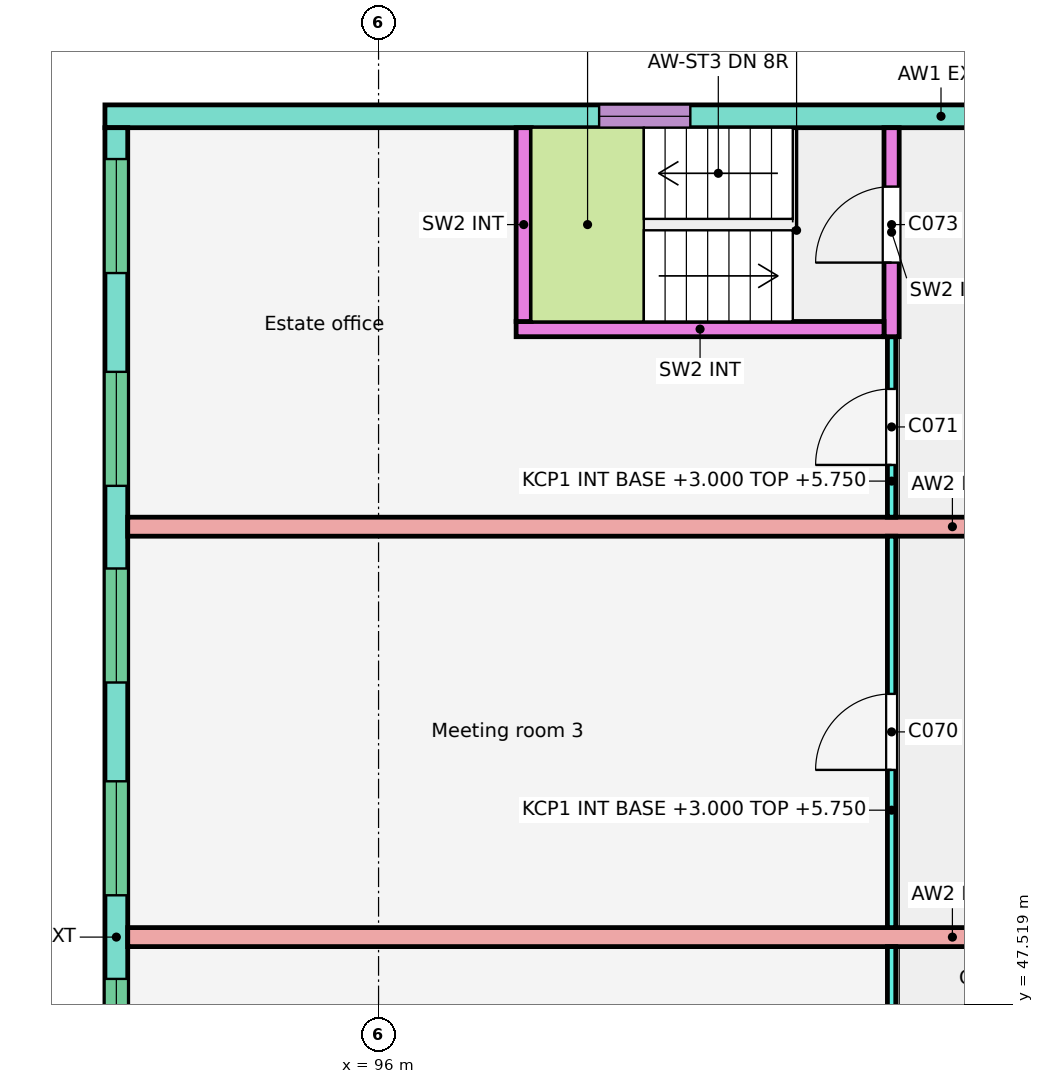
"""IFC4 building model, lengths in metres.
Left out: names, types, materials, properties, quantities, classifications, styles, units other than length and angle.
Written with IfcOpenShell. Run it as: python <this file> out.ifc"""

import sys

from ifc_helpers import new_model, si_unit, direction, frame, frame_2d, origin, place, context, subcontext, project, spatial, rectangle, extrude, element, fill, save


model = new_model("IFC4")
c1 = context("Model", 3, precision=1e-05, world=origin(), true_north=direction((0.0, 1.0)))
c2 = subcontext(c1, "Body", "Model", "MODEL_VIEW")
j1 = project(units=[si_unit("LENGTHUNIT", "METRE"), si_unit("PLANEANGLEUNIT", "RADIAN")], contexts=[c1])
p1 = place(None, origin())
s1 = spatial("IfcSite", under=j1, at=p1, CompositionType="ELEMENT")
p2 = place(p1, origin())
s2 = spatial("IfcBuilding", under=s1, at=p2, CompositionType="ELEMENT")
p3 = place(p2, frame((0.0, 0.0, 3.0)))
s3 = spatial("IfcBuildingStorey", under=s2, at=p3, CompositionType="ELEMENT", Elevation=3.0)
p4 = place(p3, frame((114.4, 59.2, 0.0), z_axis=(0.0, 0.0, 1.0), x_axis=(-1.0, 0.0, 0.0)))
e1 = element("IfcWall", 1, at=p4, inside=s3, PredefinedType="SOLIDWALL", context=c2, shape_type="SweptSolid", body=[
    extrude(rectangle(XDim=22.0, YDim=0.3, at=frame_2d((11.0, 0.0))), origin(), (0.0, 0.0, 1.0), 3.0),
])
p5 = place(p4, frame((14.298, 0.0, 0.9)))
e2 = element("IfcOpeningElement", 2, at=p5, cuts=e1, PredefinedType="OPENING", context=c2, shape_type="SweptSolid", body=[
    extrude(rectangle(XDim=1.2, YDim=1.5, at=frame_2d((0.6, 0.75))), frame((0.0, 0.16, 0.0), z_axis=(0.0, -1.0, 0.0), x_axis=(1.0, 0.0, 0.0)), (0.0, 0.0, 1.0), 0.32),
])
p6 = place(p3, frame((92.55, 37.75, 0.0), z_axis=(0.0, 0.0, 1.0), x_axis=(0.0, 1.0, 0.0)))
e3 = element("IfcWall", 3, at=p6, inside=s3, PredefinedType="SOLIDWALL", context=c2, shape_type="SweptSolid", body=[
    extrude(rectangle(XDim=21.3, YDim=0.3, at=frame_2d((10.65, 0.0))), origin(), (0.0, 0.0, 1.0), 3.0),
])
p7 = place(p6, frame((0.413, 0.0, 0.9)))
e4 = element("IfcOpeningElement", 4, at=p7, cuts=e3, PredefinedType="OPENING", context=c2, shape_type="SweptSolid", body=[
    extrude(rectangle(XDim=1.5, YDim=1.4, at=frame_2d((0.75, 0.7))), frame((0.0, 0.16, 0.0), z_axis=(0.0, -1.0, 0.0), x_axis=(1.0, 0.0, 0.0)), (0.0, 0.0, 1.0), 0.32),
])
p8 = place(p6, frame((3.212, 0.0, 0.9)))
e5 = element("IfcOpeningElement", 5, at=p8, cuts=e3, PredefinedType="OPENING", context=c2, shape_type="SweptSolid", body=[
    extrude(rectangle(XDim=1.5, YDim=1.4, at=frame_2d((0.75, 0.7))), frame((0.0, 0.16, 0.0), z_axis=(0.0, -1.0, 0.0), x_axis=(1.0, 0.0, 0.0)), (0.0, 0.0, 1.0), 0.32),
])
p9 = place(p6, frame((5.8, 0.0, 0.9)))
e6 = element("IfcOpeningElement", 6, at=p9, cuts=e3, PredefinedType="OPENING", context=c2, shape_type="SweptSolid", body=[
    extrude(rectangle(XDim=1.5, YDim=1.4, at=frame_2d((0.75, 0.7))), frame((0.0, 0.16, 0.0), z_axis=(0.0, -1.0, 0.0), x_axis=(1.0, 0.0, 0.0)), (0.0, 0.0, 1.0), 0.32),
])
p10 = place(p6, frame((8.6, 0.0, 0.9)))
e7 = element("IfcOpeningElement", 7, at=p10, cuts=e3, PredefinedType="OPENING", context=c2, shape_type="SweptSolid", body=[
    extrude(rectangle(XDim=1.5, YDim=1.4, at=frame_2d((0.75, 0.7))), frame((0.0, 0.16, 0.0), z_axis=(0.0, -1.0, 0.0), x_axis=(1.0, 0.0, 0.0)), (0.0, 0.0, 1.0), 0.32),
])
p11 = place(p6, frame((11.2, 0.0, 0.9)))
e8 = element("IfcOpeningElement", 8, at=p11, cuts=e3, PredefinedType="OPENING", context=c2, shape_type="SweptSolid", body=[
    extrude(rectangle(XDim=1.5, YDim=1.4, at=frame_2d((0.75, 0.7))), frame((0.0, 0.16, 0.0), z_axis=(0.0, -1.0, 0.0), x_axis=(1.0, 0.0, 0.0)), (0.0, 0.0, 1.0), 0.32),
])
p12 = place(p6, frame((14.0, 0.0, 0.9)))
e9 = element("IfcOpeningElement", 9, at=p12, cuts=e3, PredefinedType="OPENING", context=c2, shape_type="SweptSolid", body=[
    extrude(rectangle(XDim=1.5, YDim=1.4, at=frame_2d((0.75, 0.7))), frame((0.0, 0.16, 0.0), z_axis=(0.0, -1.0, 0.0), x_axis=(1.0, 0.0, 0.0)), (0.0, 0.0, 1.0), 0.32),
])
p13 = place(p6, frame((16.587, 0.0, 0.9)))
e10 = element("IfcOpeningElement", 10, at=p13, cuts=e3, PredefinedType="OPENING", context=c2, shape_type="SweptSolid", body=[
    extrude(rectangle(XDim=1.5, YDim=1.4, at=frame_2d((0.75, 0.7))), frame((0.0, 0.16, 0.0), z_axis=(0.0, -1.0, 0.0), x_axis=(1.0, 0.0, 0.0)), (0.0, 0.0, 1.0), 0.32),
])
p14 = place(p6, frame((19.387, 0.0, 0.9)))
e11 = element("IfcOpeningElement", 11, at=p14, cuts=e3, PredefinedType="OPENING", context=c2, shape_type="SweptSolid", body=[
    extrude(rectangle(XDim=1.5, YDim=1.4, at=frame_2d((0.75, 0.7))), frame((0.0, 0.16, 0.0), z_axis=(0.0, -1.0, 0.0), x_axis=(1.0, 0.0, 0.0)), (0.0, 0.0, 1.0), 0.32),
])
for number, where, z_axis, x_axis in (
    (12, (114.4, 48.4, 0.0), (0.0, 0.0, 1.0), (-1.0, 0.0, 0.0)),
    (13, (114.4, 53.8, 0.0), (0.0, 0.0, 1.0), (-1.0, 0.0, 0.0)),
):
    element("IfcWall", number, at=place(p3, frame(where, z_axis=z_axis, x_axis=x_axis)), inside=s3, PredefinedType="SOLIDWALL", context=c2, shape_type="SweptSolid", body=[
        extrude(rectangle(XDim=21.7, YDim=0.25, at=frame_2d((10.85, 0.0))), origin(), (0.0, 0.0, 1.0), 3.0),
    ])
p15 = place(p3, frame((102.75, 43.125, 0.0), z_axis=(0.0, 0.0, 1.0), x_axis=(0.0, 1.0, 0.0)))
e14 = element("IfcWall", 14, at=p15, inside=s3, PredefinedType="PARTITIONING", context=c2, shape_type="SweptSolid", body=[
    extrude(rectangle(XDim=5.15, YDim=0.11, at=frame_2d((2.575, 0.0))), origin(), (0.0, 0.0, 1.0), 2.75),
])
p16 = place(p15, frame((0.698, 0.0, 0.0)))
e15 = element("IfcOpeningElement", 15, at=p16, cuts=e14, PredefinedType="OPENING", context=c2, shape_type="SweptSolid", body=[
    extrude(rectangle(XDim=1.0, YDim=2.1, at=frame_2d((0.5, 1.05))), frame((0.0, 0.065, 0.0), z_axis=(0.0, -1.0, 0.0), x_axis=(1.0, 0.0, 0.0)), (0.0, 0.0, 1.0), 0.13),
])
p17 = place(p15, frame((3.327, 0.0, 0.0)))
e16 = element("IfcOpeningElement", 16, at=p17, cuts=e14, PredefinedType="OPENING", context=c2, shape_type="SweptSolid", body=[
    extrude(rectangle(XDim=1.0, YDim=2.1, at=frame_2d((0.5, 1.05))), frame((0.0, 0.065, 0.0), z_axis=(0.0, -1.0, 0.0), x_axis=(1.0, 0.0, 0.0)), (0.0, 0.0, 1.0), 0.13),
])
p18 = place(p3, frame((102.75, 48.525, 0.0), z_axis=(0.0, 0.0, 1.0), x_axis=(0.0, 1.0, 0.0)))
e17 = element("IfcWall", 17, at=p18, inside=s3, PredefinedType="PARTITIONING", context=c2, shape_type="SweptSolid", body=[
    extrude(rectangle(XDim=5.15, YDim=0.11, at=frame_2d((2.575, 0.0))), origin(), (0.0, 0.0, 1.0), 2.75),
])
p19 = place(p18, frame((2.075, 0.0, 0.0)))
e18 = element("IfcOpeningElement", 18, at=p19, cuts=e17, PredefinedType="OPENING", context=c2, shape_type="SweptSolid", body=[
    extrude(rectangle(XDim=1.0, YDim=2.1, at=frame_2d((0.5, 1.05))), frame((0.0, 0.065, 0.0), z_axis=(0.0, -1.0, 0.0), x_axis=(1.0, 0.0, 0.0)), (0.0, 0.0, 1.0), 0.13),
])
p20 = place(p3, frame((102.75, 53.925, 0.0), z_axis=(0.0, 0.0, 1.0), x_axis=(0.0, 1.0, 0.0)))
e19 = element("IfcWall", 19, at=p20, inside=s3, PredefinedType="PARTITIONING", context=c2, shape_type="SweptSolid", body=[
    extrude(rectangle(XDim=2.375, YDim=0.11, at=frame_2d((1.188, 0.0))), origin(), (0.0, 0.0, 1.0), 2.75),
])
p21 = place(p20, frame((0.688, 0.0, 0.0)))
e20 = element("IfcOpeningElement", 20, at=p21, cuts=e19, PredefinedType="OPENING", context=c2, shape_type="SweptSolid", body=[
    extrude(rectangle(XDim=1.0, YDim=2.1, at=frame_2d((0.5, 1.05))), frame((0.0, 0.065, 0.0), z_axis=(0.0, -1.0, 0.0), x_axis=(1.0, 0.0, 0.0)), (0.0, 0.0, 1.0), 0.13),
])
p22 = place(p3, frame((102.75, 56.3, 0.0), z_axis=(0.0, 0.0, 1.0), x_axis=(0.0, 1.0, 0.0)))
e21 = element("IfcWall", 21, at=p22, inside=s3, PredefinedType="SOLIDWALL", context=c2, shape_type="SweptSolid", body=[
    extrude(rectangle(XDim=2.75, YDim=0.2, at=frame_2d((1.375, 0.0))), origin(), (0.0, 0.0, 1.0), 2.75),
])
p23 = place(p22, frame((0.975, 0.0, 0.0)))
e22 = element("IfcOpeningElement", 22, at=p23, cuts=e21, PredefinedType="OPENING", context=c2, shape_type="SweptSolid", body=[
    extrude(rectangle(XDim=1.0, YDim=2.1, at=frame_2d((0.5, 1.05))), frame((0.0, 0.11, 0.0), z_axis=(0.0, -1.0, 0.0), x_axis=(1.0, 0.0, 0.0)), (0.0, 0.0, 1.0), 0.22),
])
p24 = place(p3, frame((102.65, 56.4, 0.0), z_axis=(0.0, 0.0, 1.0), x_axis=(-1.0, 0.0, 0.0)))
e23 = element("IfcWall", 23, at=p24, inside=s3, PredefinedType="SOLIDWALL", context=c2, shape_type="SweptSolid", body=[
    extrude(rectangle(XDim=4.84, YDim=0.2, at=frame_2d((2.42, 0.0))), origin(), (0.0, 0.0, 1.0), 2.75),
])
p25 = place(p3, frame((97.91, 59.05, 0.0), z_axis=(0.0, 0.0, 1.0), x_axis=(0.0, -1.0, 0.0)))
e24 = element("IfcWall", 24, at=p25, inside=s3, PredefinedType="SOLIDWALL", context=c2, shape_type="SweptSolid", body=[
    extrude(rectangle(XDim=2.55, YDim=0.2, at=frame_2d((1.275, 0.0))), origin(), (0.0, 0.0, 1.0), 2.75),
])
p26 = place(p10, origin())
e25 = element("IfcWindow", 25, at=p26, inside=s3, PartitioningType="SINGLE_PANEL", PredefinedType="WINDOW", context=c2, shape_type="SweptSolid", body=[
    extrude(rectangle(XDim=1.5, YDim=1.4, at=frame_2d((0.75, 0.7))), frame((0.0, 0.03, 0.0), z_axis=(0.0, -1.0, 0.0), x_axis=(1.0, 0.0, 0.0)), (0.0, 0.0, 1.0), 0.06),
])
fill(e7, e25)
p27 = place(p11, origin())
e26 = element("IfcWindow", 26, at=p27, inside=s3, PartitioningType="SINGLE_PANEL", PredefinedType="WINDOW", context=c2, shape_type="SweptSolid", body=[
    extrude(rectangle(XDim=1.5, YDim=1.4, at=frame_2d((0.75, 0.7))), frame((0.0, 0.03, 0.0), z_axis=(0.0, -1.0, 0.0), x_axis=(1.0, 0.0, 0.0)), (0.0, 0.0, 1.0), 0.06),
])
fill(e8, e26)
p28 = place(p12, origin())
e27 = element("IfcWindow", 27, at=p28, inside=s3, PartitioningType="SINGLE_PANEL", PredefinedType="WINDOW", context=c2, shape_type="SweptSolid", body=[
    extrude(rectangle(XDim=1.5, YDim=1.4, at=frame_2d((0.75, 0.7))), frame((0.0, 0.03, 0.0), z_axis=(0.0, -1.0, 0.0), x_axis=(1.0, 0.0, 0.0)), (0.0, 0.0, 1.0), 0.06),
])
fill(e9, e27)
p29 = place(p13, origin())
e28 = element("IfcWindow", 28, at=p29, inside=s3, PartitioningType="SINGLE_PANEL", PredefinedType="WINDOW", context=c2, shape_type="SweptSolid", body=[
    extrude(rectangle(XDim=1.5, YDim=1.4, at=frame_2d((0.75, 0.7))), frame((0.0, 0.03, 0.0), z_axis=(0.0, -1.0, 0.0), x_axis=(1.0, 0.0, 0.0)), (0.0, 0.0, 1.0), 0.06),
])
fill(e10, e28)
p30 = place(p14, origin())
e29 = element("IfcWindow", 29, at=p30, inside=s3, PartitioningType="SINGLE_PANEL", PredefinedType="WINDOW", context=c2, shape_type="SweptSolid", body=[
    extrude(rectangle(XDim=1.5, YDim=1.4, at=frame_2d((0.75, 0.7))), frame((0.0, 0.03, 0.0), z_axis=(0.0, -1.0, 0.0), x_axis=(1.0, 0.0, 0.0)), (0.0, 0.0, 1.0), 0.06),
])
fill(e11, e29)
p31 = place(p5, origin())
e30 = element("IfcWindow", 30, at=p31, inside=s3, PartitioningType="SINGLE_PANEL", PredefinedType="WINDOW", context=c2, shape_type="SweptSolid", body=[
    extrude(rectangle(XDim=1.2, YDim=1.5, at=frame_2d((0.6, 0.75))), frame((0.0, 0.03, 0.0), z_axis=(0.0, -1.0, 0.0), x_axis=(1.0, 0.0, 0.0)), (0.0, 0.0, 1.0), 0.06),
])
fill(e2, e30)
p32 = place(p19, origin())
e31 = element("IfcDoor", 31, at=p32, inside=s3, OperationType="SINGLE_SWING_LEFT", PredefinedType="DOOR", context=c2, shape_type="SweptSolid", body=[
    extrude(rectangle(XDim=1.0, YDim=2.1, at=frame_2d((0.5, 1.05))), frame((0.0, 0.025, 0.0), z_axis=(0.0, -1.0, 0.0), x_axis=(1.0, 0.0, 0.0)), (0.0, 0.0, 1.0), 0.05),
])
fill(e18, e31)
p33 = place(p21, origin())
e32 = element("IfcDoor", 32, at=p33, inside=s3, OperationType="SINGLE_SWING_LEFT", PredefinedType="DOOR", context=c2, shape_type="SweptSolid", body=[
    extrude(rectangle(XDim=1.0, YDim=2.1, at=frame_2d((0.5, 1.05))), frame((0.0, 0.025, 0.0), z_axis=(0.0, -1.0, 0.0), x_axis=(1.0, 0.0, 0.0)), (0.0, 0.0, 1.0), 0.05),
])
fill(e20, e32)
p34 = place(p23, origin())
e33 = element("IfcDoor", 33, at=p34, inside=s3, OperationType="SINGLE_SWING_LEFT", PredefinedType="DOOR", context=c2, shape_type="SweptSolid", body=[
    extrude(rectangle(XDim=1.0, YDim=2.1, at=frame_2d((0.5, 1.05))), frame((0.0, 0.025, 0.0), z_axis=(0.0, -1.0, 0.0), x_axis=(1.0, 0.0, 0.0)), (0.0, 0.0, 1.0), 0.05),
])
fill(e22, e33)
save(model, sys.argv[1])
